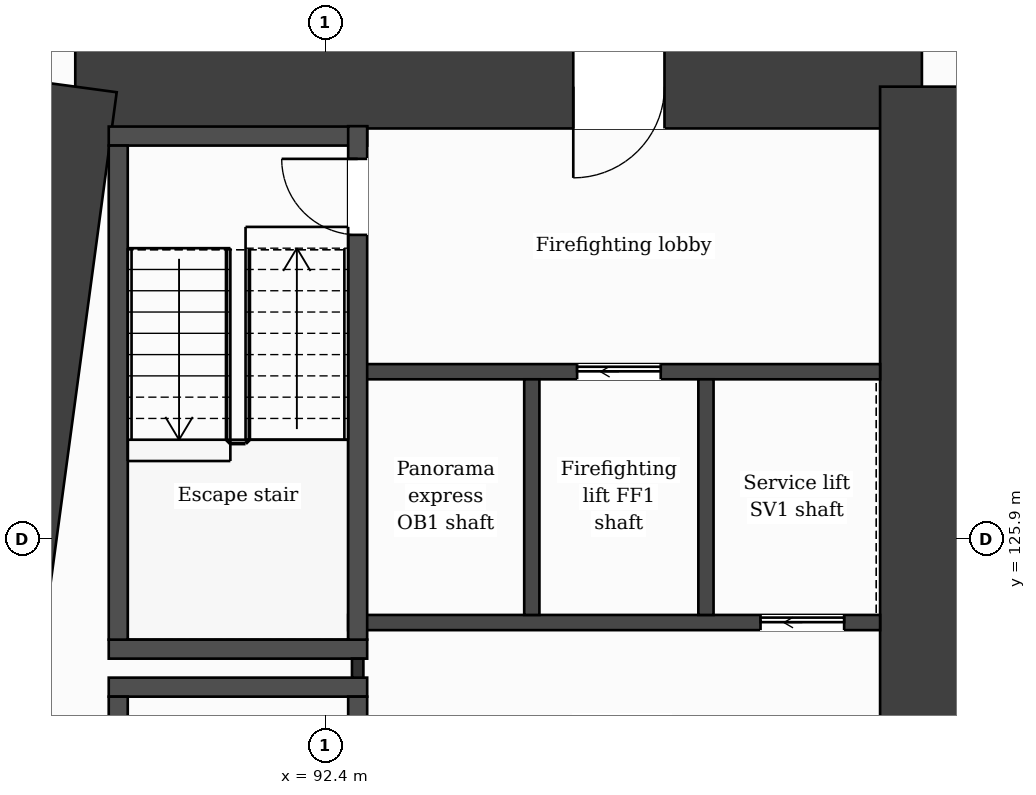
"""IFC4 building model, lengths in metres.
Left out: names, types, materials, properties, quantities, classifications, styles, units other than length and angle.
Written with IfcOpenShell. Run it as: python <this file> out.ifc"""

import sys

from ifc_helpers import new_model, si_unit, direction, frame, frame_2d, origin, place, context, subcontext, project, spatial, rectangle, extrude, element, fill, save


model = new_model("IFC4")
c1 = context("Model", 3, precision=1e-05, world=origin(), true_north=direction((0.0, 1.0)))
c2 = subcontext(c1, "Body", "Model", "MODEL_VIEW")
j1 = project(units=[si_unit("LENGTHUNIT", "METRE"), si_unit("PLANEANGLEUNIT", "RADIAN")], contexts=[c1])
p1 = place(None, origin())
s1 = spatial("IfcSite", under=j1, at=p1, CompositionType="ELEMENT")
p2 = place(p1, origin())
s2 = spatial("IfcBuilding", under=s1, at=p2, CompositionType="ELEMENT")
p3 = place(p2, frame((0.0, 0.0, 74.0)))
s3 = spatial("IfcBuildingStorey", under=s2, at=p3, CompositionType="ELEMENT", Elevation=74.0)
p4 = place(p3, frame((89.112, 131.85, 0.0), z_axis=(0.0, 0.0, 1.0), x_axis=(1.0, 0.0, 0.0)))
e1 = element("IfcWall", 1, at=p4, inside=s3, PredefinedType="SHEAR", context=c2, shape_type="SweptSolid", body=[
    extrude(rectangle(XDim=11.138, YDim=1.1, at=frame_2d((5.569, 0.0))), origin(), (0.0, 0.0, 1.0), 3.5),
])
p5 = place(p4, frame((6.552, 0.0, 0.0)))
e2 = element("IfcOpeningElement", 2, at=p5, cuts=e1, PredefinedType="OPENING", context=c2, shape_type="SweptSolid", body=[
    extrude(rectangle(XDim=1.2, YDim=2.1, at=frame_2d((0.6, 1.05))), frame((0.0, 0.56, 0.0), z_axis=(0.0, -1.0, 0.0), x_axis=(1.0, 0.0, 0.0)), (0.0, 0.0, 1.0), 1.12),
])
p6 = place(p3, frame((100.25, 131.85, 0.0), z_axis=(0.0, 0.0, 1.0), x_axis=(0.0, -1.0, 0.0)))
e3 = element("IfcWall", 3, at=p6, inside=s3, PredefinedType="SHEAR", context=c2, shape_type="SweptSolid", body=[
    extrude(rectangle(XDim=20.9, YDim=1.1, at=frame_2d((10.45, 0.0))), origin(), (0.0, 0.0, 1.0), 3.5),
])
p7 = place(p3, frame((86.298, 110.95, 0.0), z_axis=(0.0, 0.0, 1.0), x_axis=(0.133400422634, 0.99106222168, 0.0)))
e4 = element("IfcWall", 4, at=p7, inside=s3, PredefinedType="SHEAR", context=c2, shape_type="SweptSolid", body=[
    extrude(rectangle(XDim=21.089, YDim=1.1, at=frame_2d((10.544, 0.0))), origin(), (0.0, 0.0, 1.0), 3.5),
])
for number, where, z_axis, x_axis in (
    (5, (89.552, 123.95, 0.0), (0.0, 0.0, 1.0), (1.0, 0.0, 0.0)),
    (6, (89.552, 124.45, 0.0), (0.0, 0.0, 1.0), (1.0, 0.0, 0.0)),
):
    element("IfcWall", number, at=place(p3, frame(where, z_axis=z_axis, x_axis=x_axis)), inside=s3, PredefinedType="PARTITIONING", context=c2, shape_type="SweptSolid", body=[
        extrude(rectangle(XDim=3.4, YDim=0.25, at=frame_2d((1.7, 0.0))), origin(), (0.0, 0.0, 1.0), 3.18),
    ])
p8 = place(p3, frame((92.702, 124.8, 0.0), z_axis=(0.0, 0.0, 1.0), x_axis=(1.0, 0.0, 0.0)))
e7 = element("IfcWall", 7, at=p8, inside=s3, PredefinedType="PARTITIONING", context=c2, shape_type="SweptSolid", body=[
    extrude(rectangle(XDim=6.998, YDim=0.2, at=frame_2d((3.499, 0.0))), origin(), (0.0, 0.0, 1.0), 3.18),
])
p9 = place(p8, frame((5.425, 0.0, 0.0)))
e8 = element("IfcOpeningElement", 8, at=p9, cuts=e7, PredefinedType="OPENING", context=c2, shape_type="SweptSolid", body=[
    extrude(rectangle(XDim=1.1, YDim=2.1, at=frame_2d((0.55, 1.05))), frame((0.0, 0.11, 0.0), z_axis=(0.0, -1.0, 0.0), x_axis=(1.0, 0.0, 0.0)), (0.0, 0.0, 1.0), 0.22),
])
p10 = place(p3, frame((92.827, 128.1, 0.0), z_axis=(0.0, 0.0, 1.0), x_axis=(1.0, 0.0, 0.0)))
e9 = element("IfcWall", 9, at=p10, inside=s3, PredefinedType="PARTITIONING", context=c2, shape_type="SweptSolid", body=[
    extrude(rectangle(XDim=6.873, YDim=0.2, at=frame_2d((3.437, 0.0))), origin(), (0.0, 0.0, 1.0), 3.18),
])
p11 = place(p10, frame((2.887, 0.0, 0.0)))
e10 = element("IfcOpeningElement", 10, at=p11, cuts=e9, PredefinedType="OPENING", context=c2, shape_type="SweptSolid", body=[
    extrude(rectangle(XDim=1.1, YDim=2.1, at=frame_2d((0.55, 1.05))), frame((0.0, 0.11, 0.0), z_axis=(0.0, -1.0, 0.0), x_axis=(1.0, 0.0, 0.0)), (0.0, 0.0, 1.0), 0.22),
])
p12 = place(p3, frame((89.552, 131.2, 0.0), z_axis=(0.0, 0.0, 1.0), x_axis=(1.0, 0.0, 0.0)))
e11 = element("IfcWall", 11, at=p12, inside=s3, PredefinedType="PARTITIONING", context=c2, shape_type="SweptSolid", body=[
    extrude(rectangle(XDim=3.4, YDim=0.25, at=frame_2d((1.7, 0.0))), origin(), (0.0, 0.0, 1.0), 3.18),
])
p13 = place(p3, frame((89.677, 117.07, 0.0), z_axis=(0.0, 0.0, 1.0), x_axis=(0.0, 1.0, 0.0)))
e12 = element("IfcWall", 12, at=p13, inside=s3, PredefinedType="PARTITIONING", context=c2, shape_type="SweptSolid", body=[
    extrude(rectangle(XDim=6.755, YDim=0.25, at=frame_2d((3.377, 0.0))), origin(), (0.0, 0.0, 1.0), 3.18),
])
p14 = place(p3, frame((89.677, 124.575, 0.0), z_axis=(0.0, 0.0, 1.0), x_axis=(0.0, 1.0, 0.0)))
e13 = element("IfcWall", 13, at=p14, inside=s3, PredefinedType="PARTITIONING", context=c2, shape_type="SweptSolid", body=[
    extrude(rectangle(XDim=6.5, YDim=0.25, at=frame_2d((3.25, 0.0))), origin(), (0.0, 0.0, 1.0), 3.18),
])
p15 = place(p3, frame((92.827, 124.075, 0.0), z_axis=(0.0, 0.0, 1.0), x_axis=(0.0, 1.0, 0.0)))
e14 = element("IfcWall", 14, at=p15, inside=s3, PredefinedType="PARTITIONING", context=c2, shape_type="SweptSolid", body=[
    extrude(rectangle(XDim=0.25, YDim=0.15, at=frame_2d((0.125, 0.0))), origin(), (0.0, 0.0, 1.0), 3.18),
])
p16 = place(p3, frame((92.827, 117.07, 0.0), z_axis=(0.0, 0.0, 1.0), x_axis=(0.0, 1.0, 0.0)))
e15 = element("IfcWall", 15, at=p16, inside=s3, PredefinedType="PARTITIONING", context=c2, shape_type="SweptSolid", body=[
    extrude(rectangle(XDim=6.755, YDim=0.25, at=frame_2d((3.377, 0.0))), origin(), (0.0, 0.0, 1.0), 3.18),
])
p17 = place(p16, frame((5.455, 0.0, 0.0)))
e16 = element("IfcOpeningElement", 16, at=p17, cuts=e15, PredefinedType="OPENING", context=c2, shape_type="SweptSolid", body=[
    extrude(rectangle(XDim=0.95, YDim=2.1, at=frame_2d((0.475, 1.05))), frame((0.0, 0.135, 0.0), z_axis=(0.0, -1.0, 0.0), x_axis=(1.0, 0.0, 0.0)), (0.0, 0.0, 1.0), 0.27),
])
p18 = place(p3, frame((92.827, 124.575, 0.0), z_axis=(0.0, 0.0, 1.0), x_axis=(0.0, 1.0, 0.0)))
e17 = element("IfcWall", 17, at=p18, inside=s3, PredefinedType="PARTITIONING", context=c2, shape_type="SweptSolid", body=[
    extrude(rectangle(XDim=6.755, YDim=0.25, at=frame_2d((3.377, 0.0))), origin(), (0.0, 0.0, 1.0), 3.18),
])
p19 = place(p18, frame((5.325, 0.0, 0.0)))
e18 = element("IfcOpeningElement", 18, at=p19, cuts=e17, PredefinedType="OPENING", context=c2, shape_type="SweptSolid", body=[
    extrude(rectangle(XDim=1.0, YDim=2.1, at=frame_2d((0.5, 1.05))), frame((0.0, 0.135, 0.0), z_axis=(0.0, -1.0, 0.0), x_axis=(1.0, 0.0, 0.0)), (0.0, 0.0, 1.0), 0.27),
])
for number, where, z_axis, x_axis in (
    (19, (95.118, 124.9, 0.0), (0.0, 0.0, 1.0), (0.0, 1.0, 0.0)),
    (20, (97.409, 124.9, 0.0), (0.0, 0.0, 1.0), (0.0, 1.0, 0.0)),
):
    element("IfcWall", number, at=place(p3, frame(where, z_axis=z_axis, x_axis=x_axis)), inside=s3, PredefinedType="PARTITIONING", context=c2, shape_type="SweptSolid", body=[
        extrude(rectangle(XDim=3.1, YDim=0.2, at=frame_2d((1.55, 0.0))), origin(), (0.0, 0.0, 1.0), 3.18),
    ])
p20 = place(p11, origin())
e21 = element("IfcDoor", 21, at=p20, inside=s3, OperationType="SLIDING_TO_LEFT", PredefinedType="DOOR", context=c2, shape_type="SweptSolid", body=[
    extrude(rectangle(XDim=1.1, YDim=2.1, at=frame_2d((0.55, 1.05))), frame((0.0, 0.025, 0.0), z_axis=(0.0, -1.0, 0.0), x_axis=(1.0, 0.0, 0.0)), (0.0, 0.0, 1.0), 0.05),
])
fill(e10, e21)
p21 = place(p9, origin())
e22 = element("IfcDoor", 22, at=p21, inside=s3, OperationType="SLIDING_TO_LEFT", PredefinedType="DOOR", context=c2, shape_type="SweptSolid", body=[
    extrude(rectangle(XDim=1.1, YDim=2.1, at=frame_2d((0.55, 1.05))), frame((0.0, 0.025, 0.0), z_axis=(0.0, -1.0, 0.0), x_axis=(1.0, 0.0, 0.0)), (0.0, 0.0, 1.0), 0.05),
])
fill(e8, e22)
p22 = place(p19, origin())
e23 = element("IfcDoor", 23, at=p22, inside=s3, OperationType="SINGLE_SWING_RIGHT", PredefinedType="DOOR", context=c2, shape_type="SweptSolid", body=[
    extrude(rectangle(XDim=1.0, YDim=2.1, at=frame_2d((0.5, 1.05))), frame((0.0, 0.025, 0.0), z_axis=(0.0, -1.0, 0.0), x_axis=(1.0, 0.0, 0.0)), (0.0, 0.0, 1.0), 0.05),
])
fill(e18, e23)
p23 = place(p5, origin())
e24 = element("IfcDoor", 24, at=p23, inside=s3, OperationType="SINGLE_SWING_LEFT", PredefinedType="DOOR", context=c2, shape_type="SweptSolid", body=[
    extrude(rectangle(XDim=1.2, YDim=2.1, at=frame_2d((0.6, 1.05))), frame((0.0, 0.025, 0.0), z_axis=(0.0, -1.0, 0.0), x_axis=(1.0, 0.0, 0.0)), (0.0, 0.0, 1.0), 0.05),
])
fill(e2, e24)
save(model, sys.argv[1])
